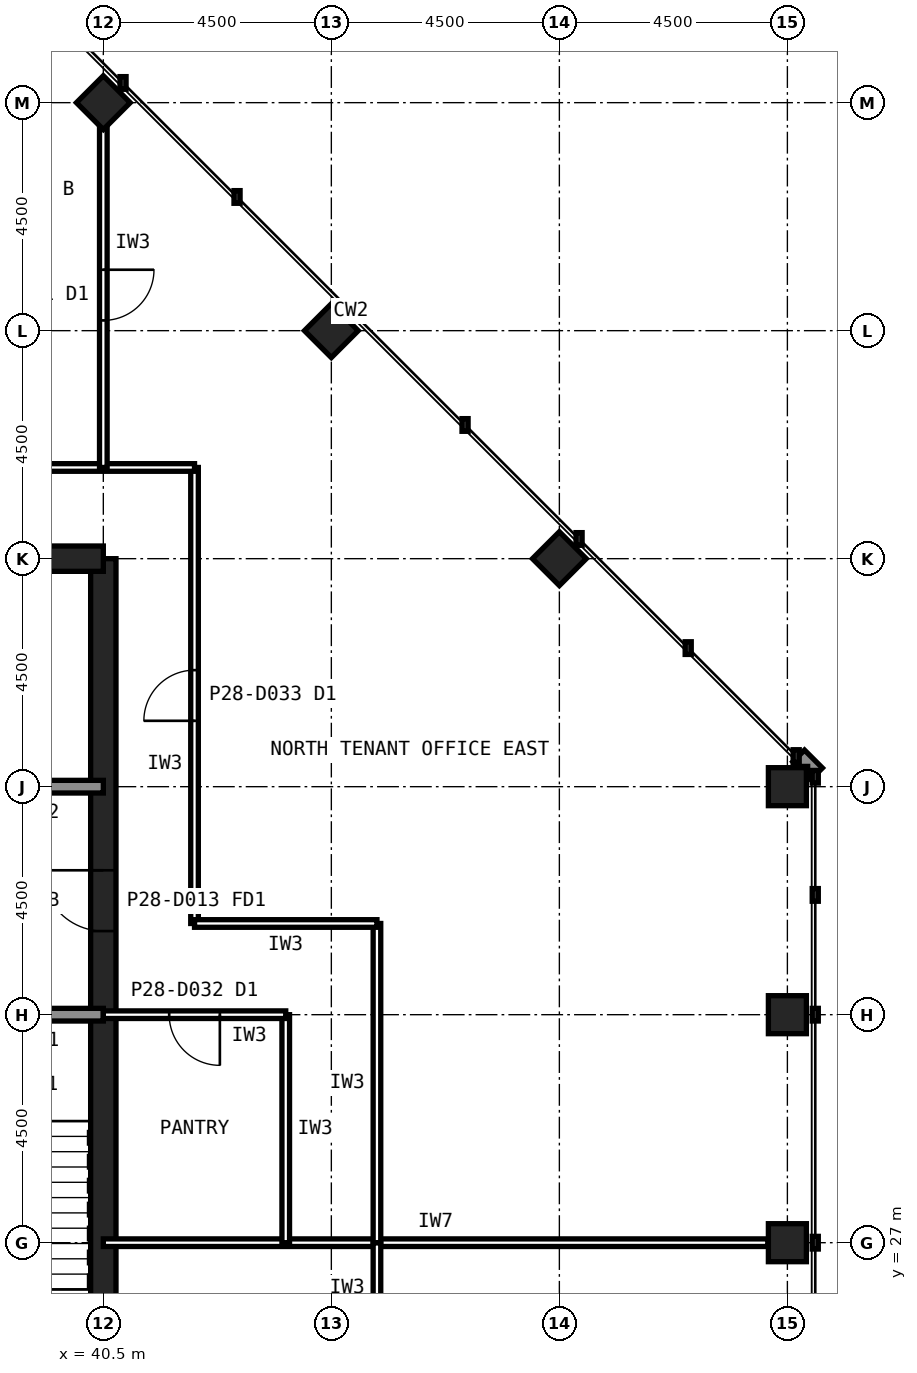
"""IFC4 building model, lengths in metres.
Left out: names, types, materials, properties, quantities, classifications, styles, units other than length and angle.
Written with IfcOpenShell. Run it as: python <this file> out.ifc"""

import sys

from ifc_helpers import new_model, si_unit, direction, frame, frame_2d, origin, origin_2d, place, context, subcontext, project, spatial, rectangle, hollow_rectangle, extrude, element, fill, save


model = new_model("IFC4")
c1 = context("Model", 3, precision=1e-05, world=origin(), true_north=direction((0.0, 1.0)))
c2 = subcontext(c1, "Body", "Model", "MODEL_VIEW")
j1 = project(units=[si_unit("LENGTHUNIT", "METRE"), si_unit("PLANEANGLEUNIT", "RADIAN")], contexts=[c1])
p1 = place(None, origin())
s1 = spatial("IfcSite", under=j1, at=p1, CompositionType="ELEMENT")
p2 = place(p1, origin())
s2 = spatial("IfcBuilding", under=s1, at=p2, CompositionType="ELEMENT")
p3 = place(p2, frame((0.0, 0.0, 119.6)))
s3 = spatial("IfcBuildingStorey", under=s2, at=p3, CompositionType="ELEMENT", Elevation=119.6)
for number, where, z_axis, x_axis in (
    (1, (54.0, 27.0, 0.0), (0.0, 0.0, 1.0), (1.0, 0.0, 0.0)),
    (2, (54.0, 31.5, 0.0), (0.0, 0.0, 1.0), (1.0, 0.0, 0.0)),
    (3, (54.0, 36.0, 0.0), (0.0, 0.0, 1.0), (1.0, 0.0, 0.0)),
    (4, (49.5, 40.5, 0.0), (0.0, 0.0, 1.0), (0.707, 0.707, 0.0)),
    (5, (45.0, 45.0, 0.0), (0.0, 0.0, 1.0), (0.707, 0.707, 0.0)),
    (6, (40.5, 49.5, 0.0), (0.0, 0.0, 1.0), (0.707, 0.707, 0.0)),
):
    element("IfcColumn", number, at=place(p3, frame(where, z_axis=z_axis, x_axis=x_axis)), inside=s3, PredefinedType="COLUMN", context=c2, shape_type="SweptSolid", body=[
        extrude(hollow_rectangle(XDim=0.75, YDim=0.75, WallThickness=0.04, at=origin_2d()), origin(), (0.0, 0.0, 1.0), 4.0),
    ])
p4 = place(p3, frame((40.5, 13.5, 0.0), z_axis=(0.0, 0.0, 1.0), x_axis=(0.0, 1.0, 0.0)))
e7 = element("IfcWall", 7, at=p4, inside=s3, PredefinedType="SHEAR", context=c2, shape_type="SweptSolid", body=[
    extrude(rectangle(XDim=27.0, YDim=0.5, at=frame_2d((13.5, 0.0))), origin(), (0.0, 0.0, 1.0), 4.0),
])
p5 = place(p4, frame((5.85, 0.0, 0.0)))
e8 = element("IfcOpeningElement", 8, at=p5, cuts=e7, PredefinedType="OPENING", context=c2, shape_type="SweptSolid", body=[
    extrude(rectangle(XDim=1.8, YDim=2.1, at=frame_2d((0.9, 1.05))), frame((0.0, 0.26, 0.0), z_axis=(0.0, -1.0, 0.0), x_axis=(1.0, 0.0, 0.0)), (0.0, 0.0, 1.0), 0.52),
])
p6 = place(p4, frame((19.65, 0.0, 0.0)))
e9 = element("IfcOpeningElement", 9, at=p6, cuts=e7, PredefinedType="OPENING", context=c2, shape_type="SweptSolid", body=[
    extrude(rectangle(XDim=1.2, YDim=2.1, at=frame_2d((0.6, 1.05))), frame((0.0, 0.26, 0.0), z_axis=(0.0, -1.0, 0.0), x_axis=(1.0, 0.0, 0.0)), (0.0, 0.0, 1.0), 0.52),
])
p7 = place(p3, frame((40.5, 40.5, 0.0), z_axis=(0.0, 0.0, 1.0), x_axis=(-1.0, 0.0, 0.0)))
e10 = element("IfcWall", 10, at=p7, inside=s3, PredefinedType="SHEAR", context=c2, shape_type="SweptSolid", body=[
    extrude(rectangle(XDim=27.0, YDim=0.5, at=frame_2d((13.5, 0.0))), origin(), (0.0, 0.0, 1.0), 4.0),
])
p8 = place(p3, frame((13.5, 36.0, 0.0), z_axis=(0.0, 0.0, 1.0), x_axis=(1.0, 0.0, 0.0)))
e11 = element("IfcWall", 11, at=p8, inside=s3, PredefinedType="SOLIDWALL", context=c2, shape_type="SweptSolid", body=[
    extrude(rectangle(XDim=27.0, YDim=0.25, at=frame_2d((13.5, 0.0))), origin(), (0.0, 0.0, 1.0), 3.84),
])
p9 = place(p8, frame((1.8, 0.0, 0.0)))
e12 = element("IfcOpeningElement", 12, at=p9, cuts=e11, PredefinedType="OPENING", context=c2, shape_type="SweptSolid", body=[
    extrude(rectangle(XDim=0.9, YDim=2.1, at=frame_2d((0.45, 1.05))), frame((0.0, 0.135, 0.0), z_axis=(0.0, -1.0, 0.0), x_axis=(1.0, 0.0, 0.0)), (0.0, 0.0, 1.0), 0.27),
])
p10 = place(p8, frame((5.55, 0.0, 0.0)))
e13 = element("IfcOpeningElement", 13, at=p10, cuts=e11, PredefinedType="OPENING", context=c2, shape_type="SweptSolid", body=[
    extrude(rectangle(XDim=0.9, YDim=2.1, at=frame_2d((0.45, 1.05))), frame((0.0, 0.135, 0.0), z_axis=(0.0, -1.0, 0.0), x_axis=(1.0, 0.0, 0.0)), (0.0, 0.0, 1.0), 0.27),
])
p11 = place(p8, frame((8.55, 0.0, 0.0)))
e14 = element("IfcOpeningElement", 14, at=p11, cuts=e11, PredefinedType="OPENING", context=c2, shape_type="SweptSolid", body=[
    extrude(rectangle(XDim=0.9, YDim=2.1, at=frame_2d((0.45, 1.05))), frame((0.0, 0.135, 0.0), z_axis=(0.0, -1.0, 0.0), x_axis=(1.0, 0.0, 0.0)), (0.0, 0.0, 1.0), 0.27),
])
p12 = place(p8, frame((24.1, 0.0, 0.0)))
e15 = element("IfcOpeningElement", 15, at=p12, cuts=e11, PredefinedType="OPENING", context=c2, shape_type="SweptSolid", body=[
    extrude(rectangle(XDim=1.3, YDim=2.2, at=frame_2d((0.65, 1.1))), frame((0.0, 0.135, 0.0), z_axis=(0.0, -1.0, 0.0), x_axis=(1.0, 0.0, 0.0)), (0.0, 0.0, 1.0), 0.27),
])
p13 = place(p3, frame((13.5, 31.5, 0.0), z_axis=(0.0, 0.0, 1.0), x_axis=(1.0, 0.0, 0.0)))
e16 = element("IfcWall", 16, at=p13, inside=s3, PredefinedType="SOLIDWALL", context=c2, shape_type="SweptSolid", body=[
    extrude(rectangle(XDim=27.0, YDim=0.25, at=frame_2d((13.5, 0.0))), origin(), (0.0, 0.0, 1.0), 3.84),
])
p14 = place(p13, frame((24.15, 0.0, 0.0)))
e17 = element("IfcOpeningElement", 17, at=p14, cuts=e16, PredefinedType="OPENING", context=c2, shape_type="SweptSolid", body=[
    extrude(rectangle(XDim=1.2, YDim=2.1, at=frame_2d((0.6, 1.05))), frame((0.0, 0.135, 0.0), z_axis=(0.0, -1.0, 0.0), x_axis=(1.0, 0.0, 0.0)), (0.0, 0.0, 1.0), 0.27),
])
p15 = place(p13, frame((15.3, 0.0, 0.0)))
e18 = element("IfcOpeningElement", 18, at=p15, cuts=e16, PredefinedType="OPENING", context=c2, shape_type="SweptSolid", body=[
    extrude(rectangle(XDim=0.9, YDim=2.1, at=frame_2d((0.45, 1.05))), frame((0.0, 0.135, 0.0), z_axis=(0.0, -1.0, 0.0), x_axis=(1.0, 0.0, 0.0)), (0.0, 0.0, 1.0), 0.27),
])
p16 = place(p13, frame((19.8, 0.0, 0.0)))
e19 = element("IfcOpeningElement", 19, at=p16, cuts=e16, PredefinedType="OPENING", context=c2, shape_type="SweptSolid", body=[
    extrude(rectangle(XDim=0.9, YDim=2.1, at=frame_2d((0.45, 1.05))), frame((0.0, 0.135, 0.0), z_axis=(0.0, -1.0, 0.0), x_axis=(1.0, 0.0, 0.0)), (0.0, 0.0, 1.0), 0.27),
])
p17 = place(p3, frame((40.5, 27.0, 0.0), z_axis=(0.0, 0.0, 1.0), x_axis=(1.0, 0.0, 0.0)))
e20 = element("IfcWall", 20, at=p17, inside=s3, PredefinedType="PARTITIONING", context=c2, shape_type="SweptSolid", body=[
    extrude(rectangle(XDim=13.115, YDim=0.15, at=frame_2d((6.558, 0.0))), origin(), (0.0, 0.0, 1.0), 2.989),
])
p18 = place(p3, frame((45.9, 25.2, 0.0), z_axis=(0.0, 0.0, 1.0), x_axis=(0.0, 1.0, 0.0)))
e21 = element("IfcWall", 21, at=p18, inside=s3, PredefinedType="PARTITIONING", context=c2, shape_type="SweptSolid", body=[
    extrude(rectangle(XDim=1.8, YDim=0.15, at=frame_2d((0.9, 0.0))), origin(), (0.0, 0.0, 1.0), 3.84),
])
p19 = place(p3, frame((42.3, 33.3, 0.0), z_axis=(0.0, 0.0, 1.0), x_axis=(0.0, 1.0, 0.0)))
e22 = element("IfcWall", 22, at=p19, inside=s3, PredefinedType="PARTITIONING", context=c2, shape_type="SweptSolid", body=[
    extrude(rectangle(XDim=9.0, YDim=0.15, at=frame_2d((4.5, 0.0))), origin(), (0.0, 0.0, 1.0), 3.84),
])
p20 = place(p19, frame((4.0, 0.0, 0.0)))
e23 = element("IfcOpeningElement", 23, at=p20, cuts=e22, PredefinedType="OPENING", context=c2, shape_type="SweptSolid", body=[
    extrude(rectangle(XDim=1.0, YDim=2.1, at=frame_2d((0.5, 1.05))), frame((0.0, 0.085, 0.0), z_axis=(0.0, -1.0, 0.0), x_axis=(1.0, 0.0, 0.0)), (0.0, 0.0, 1.0), 0.17),
])
p21 = place(p3, frame((42.3, 42.3, 0.0), z_axis=(0.0, 0.0, 1.0), x_axis=(-1.0, 0.0, 0.0)))
e24 = element("IfcWall", 24, at=p21, inside=s3, PredefinedType="PARTITIONING", context=c2, shape_type="SweptSolid", body=[
    extrude(rectangle(XDim=9.0, YDim=0.15, at=frame_2d((4.5, 0.0))), origin(), (0.0, 0.0, 1.0), 3.84),
])
p22 = place(p3, frame((45.9, 27.0, 0.0), z_axis=(0.0, 0.0, 1.0), x_axis=(0.0, 1.0, 0.0)))
e25 = element("IfcWall", 25, at=p22, inside=s3, PredefinedType="PARTITIONING", context=c2, shape_type="SweptSolid", body=[
    extrude(rectangle(XDim=6.3, YDim=0.15, at=frame_2d((3.15, 0.0))), origin(), (0.0, 0.0, 1.0), 3.84),
])
p23 = place(p3, frame((45.9, 33.3, 0.0), z_axis=(0.0, 0.0, 1.0), x_axis=(-1.0, 0.0, 0.0)))
e26 = element("IfcWall", 26, at=p23, inside=s3, PredefinedType="PARTITIONING", context=c2, shape_type="SweptSolid", body=[
    extrude(rectangle(XDim=3.6, YDim=0.15, at=frame_2d((1.8, 0.0))), origin(), (0.0, 0.0, 1.0), 3.84),
])
p24 = place(p3, frame((44.1, 27.0, 0.0), z_axis=(0.0, 0.0, 1.0), x_axis=(0.0, 1.0, 0.0)))
e27 = element("IfcWall", 27, at=p24, inside=s3, PredefinedType="PARTITIONING", context=c2, shape_type="SweptSolid", body=[
    extrude(rectangle(XDim=4.5, YDim=0.15, at=frame_2d((2.25, 0.0))), origin(), (0.0, 0.0, 1.0), 3.84),
])
p25 = place(p3, frame((44.1, 31.5, 0.0), z_axis=(0.0, 0.0, 1.0), x_axis=(-1.0, 0.0, 0.0)))
e28 = element("IfcWall", 28, at=p25, inside=s3, PredefinedType="PARTITIONING", context=c2, shape_type="SweptSolid", body=[
    extrude(rectangle(XDim=3.6, YDim=0.15, at=frame_2d((1.8, 0.0))), origin(), (0.0, 0.0, 1.0), 2.989),
])
p26 = place(p25, frame((1.3, 0.0, 0.0)))
e29 = element("IfcOpeningElement", 29, at=p26, cuts=e28, PredefinedType="OPENING", context=c2, shape_type="SweptSolid", body=[
    extrude(rectangle(XDim=1.0, YDim=2.1, at=frame_2d((0.5, 1.05))), frame((0.0, 0.085, 0.0), z_axis=(0.0, -1.0, 0.0), x_axis=(1.0, 0.0, 0.0)), (0.0, 0.0, 1.0), 0.17),
])
p27 = place(p3, frame((40.5, 49.105, 0.0), z_axis=(0.0, 0.0, 1.0), x_axis=(0.0, -1.0, 0.0)))
e30 = element("IfcWall", 30, at=p27, inside=s3, PredefinedType="PARTITIONING", context=c2, shape_type="SweptSolid", body=[
    extrude(rectangle(XDim=6.805, YDim=0.15, at=frame_2d((3.402, 0.0))), origin(), (0.0, 0.0, 1.0), 2.989),
])
p28 = place(p27, frame((2.903, 0.0, 0.0)))
e31 = element("IfcOpeningElement", 31, at=p28, cuts=e30, PredefinedType="OPENING", context=c2, shape_type="SweptSolid", body=[
    extrude(rectangle(XDim=1.0, YDim=2.1, at=frame_2d((0.5, 1.05))), frame((0.0, 0.085, 0.0), z_axis=(0.0, -1.0, 0.0), x_axis=(1.0, 0.0, 0.0)), (0.0, 0.0, 1.0), 0.17),
])
p29 = place(p6, origin())
e32 = element("IfcDoor", 32, at=p29, inside=s3, OperationType="SINGLE_SWING_RIGHT", PredefinedType="DOOR", context=c2, shape_type="SweptSolid", body=[
    extrude(rectangle(XDim=1.2, YDim=2.1, at=frame_2d((0.6, 1.05))), frame((0.0, 0.025, 0.0), z_axis=(0.0, -1.0, 0.0), x_axis=(1.0, 0.0, 0.0)), (0.0, 0.0, 1.0), 0.05),
])
fill(e9, e32)
p30 = place(p20, origin())
e33 = element("IfcDoor", 33, at=p30, inside=s3, OperationType="SINGLE_SWING_LEFT", PredefinedType="DOOR", context=c2, shape_type="SweptSolid", body=[
    extrude(rectangle(XDim=1.0, YDim=2.1, at=frame_2d((0.5, 1.05))), frame((0.0, 0.025, 0.0), z_axis=(0.0, -1.0, 0.0), x_axis=(1.0, 0.0, 0.0)), (0.0, 0.0, 1.0), 0.05),
])
fill(e23, e33)
p31 = place(p26, origin())
e34 = element("IfcDoor", 34, at=p31, inside=s3, OperationType="SINGLE_SWING_LEFT", PredefinedType="DOOR", context=c2, shape_type="SweptSolid", body=[
    extrude(rectangle(XDim=1.0, YDim=2.1, at=frame_2d((0.5, 1.05))), frame((0.0, 0.025, 0.0), z_axis=(0.0, -1.0, 0.0), x_axis=(1.0, 0.0, 0.0)), (0.0, 0.0, 1.0), 0.05),
])
fill(e29, e34)
p32 = place(p28, origin())
e35 = element("IfcDoor", 35, at=p32, inside=s3, OperationType="SINGLE_SWING_LEFT", PredefinedType="DOOR", context=c2, shape_type="SweptSolid", body=[
    extrude(rectangle(XDim=1.0, YDim=2.1, at=frame_2d((0.5, 1.05))), frame((0.0, 0.025, 0.0), z_axis=(0.0, -1.0, 0.0), x_axis=(1.0, 0.0, 0.0)), (0.0, 0.0, 1.0), 0.05),
])
fill(e31, e35)
save(model, sys.argv[1])
